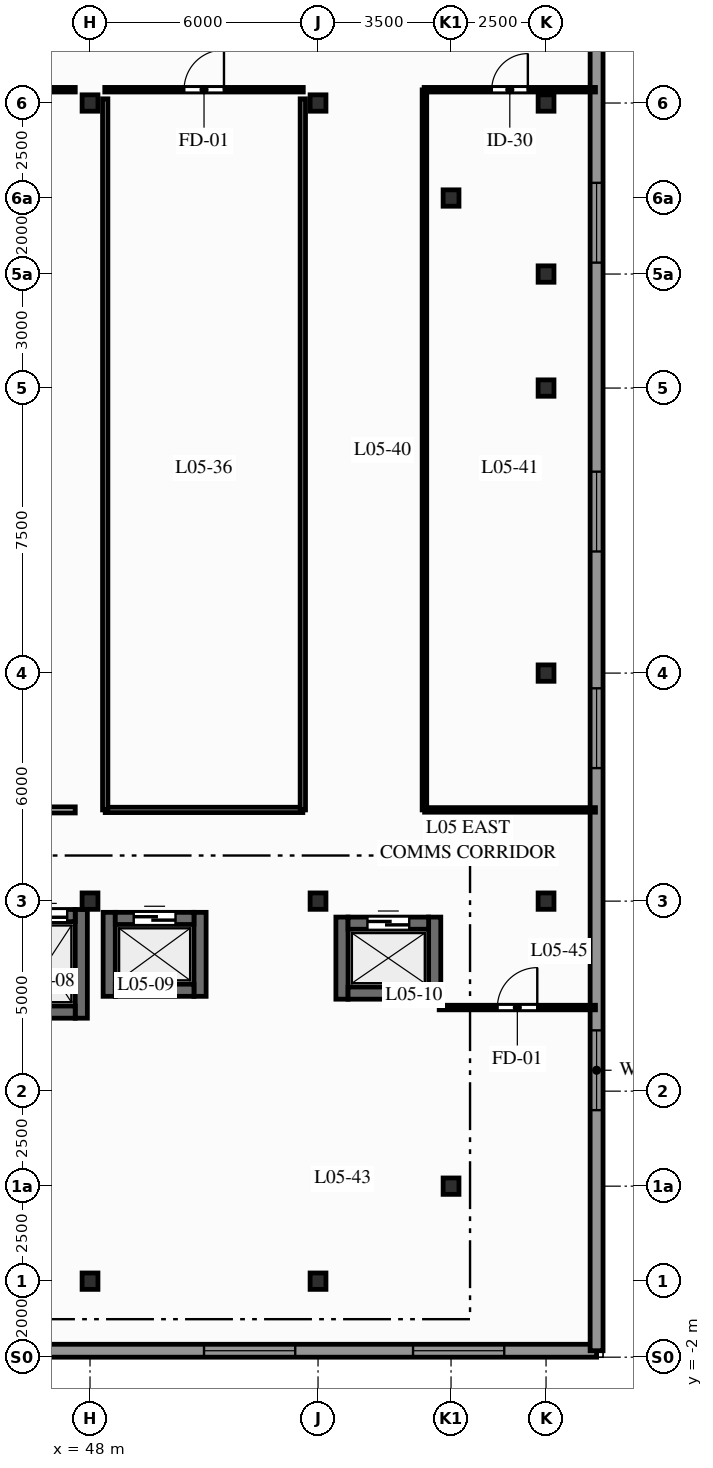
"""IFC4 building model, lengths in metres.
Left out: names, types, materials, properties, quantities, classifications, styles, units other than length and angle.
Written with IfcOpenShell. Run it as: python <this file> out.ifc"""

import sys

from ifc_helpers import new_model, si_unit, direction, frame, frame_2d, origin, origin_2d, place, context, subcontext, project, spatial, rectangle, i_section, extrude, element, fill, save


model = new_model("IFC4")
c1 = context("Model", 3, precision=1e-05, world=origin(), true_north=direction((0.0, 1.0)))
c2 = subcontext(c1, "Body", "Model", "MODEL_VIEW")
j1 = project(units=[si_unit("LENGTHUNIT", "METRE"), si_unit("PLANEANGLEUNIT", "RADIAN")], contexts=[c1])
p1 = place(None, origin())
s1 = spatial("IfcSite", under=j1, at=p1, CompositionType="ELEMENT")
p2 = place(p1, origin())
s2 = spatial("IfcBuilding", under=s1, at=p2, CompositionType="ELEMENT")
p3 = place(p2, frame((0.0, 0.0, 22.5)))
s3 = spatial("IfcBuildingStorey", under=s2, at=p3, CompositionType="ELEMENT", Elevation=22.5)
for number, where, z_axis, x_axis in (
    (1, (48.0, 0.0, 0.0), (0.0, 0.0, 1.0), (1.0, 0.0, 0.0)),
    (2, (48.0, 10.0, 0.0), (0.0, 0.0, 1.0), (1.0, 0.0, 0.0)),
    (3, (48.0, 31.0, 0.0), (0.0, 0.0, 1.0), (1.0, 0.0, 0.0)),
    (4, (54.0, 0.0, 0.0), (0.0, 0.0, 1.0), (1.0, 0.0, 0.0)),
    (5, (54.0, 10.0, 0.0), (0.0, 0.0, 1.0), (1.0, 0.0, 0.0)),
    (6, (54.0, 31.0, 0.0), (0.0, 0.0, 1.0), (1.0, 0.0, 0.0)),
    (7, (57.5, 2.5, 0.0), (0.0, 0.0, 1.0), (1.0, 0.0, 0.0)),
    (8, (57.5, 28.5, 0.0), (0.0, 0.0, 1.0), (1.0, 0.0, 0.0)),
    (9, (60.0, 10.0, 0.0), (0.0, 0.0, 1.0), (1.0, 0.0, 0.0)),
    (10, (60.0, 16.0, 0.0), (0.0, 0.0, 1.0), (1.0, 0.0, 0.0)),
    (11, (60.0, 23.5, 0.0), (0.0, 0.0, 1.0), (1.0, 0.0, 0.0)),
    (12, (60.0, 26.5, 0.0), (0.0, 0.0, 1.0), (1.0, 0.0, 0.0)),
    (13, (60.0, 31.0, 0.0), (0.0, 0.0, 1.0), (1.0, 0.0, 0.0)),
):
    element("IfcColumn", number, at=place(p3, frame(where, z_axis=z_axis, x_axis=x_axis)), inside=s3, PredefinedType="COLUMN", context=c2, shape_type="SweptSolid", body=[
        extrude(i_section(OverallWidth=0.417, OverallDepth=0.431, WebThickness=0.065, FlangeThickness=0.106, FilletRadius=0.015, at=origin_2d()), origin(), (0.0, 0.0, 1.0), 5.5),
    ])
p4 = place(p3, frame((-1.33, -1.83, 0.0), z_axis=(0.0, 0.0, 1.0), x_axis=(1.0, 0.0, 0.0)))
e14 = element("IfcWall", 14, at=p4, inside=s3, PredefinedType="STANDARD", context=c2, shape_type="SweptSolid", body=[
    extrude(rectangle(XDim=62.66, YDim=0.34, at=frame_2d((31.33, 0.0))), origin(), (0.0, 0.0, 1.0), 5.23),
])
p5 = place(p4, frame((2.83, 0.0, 0.9)))
e15 = element("IfcOpeningElement", 15, at=p5, cuts=e14, PredefinedType="OPENING", context=c2, shape_type="SweptSolid", body=[
    extrude(rectangle(XDim=2.4, YDim=2.15, at=frame_2d((1.2, 1.075))), frame((0.0, 0.18, 0.0), z_axis=(0.0, -1.0, 0.0), x_axis=(1.0, 0.0, 0.0)), (0.0, 0.0, 1.0), 0.36),
])
p6 = place(p4, frame((8.33, 0.0, 0.9)))
e16 = element("IfcOpeningElement", 16, at=p6, cuts=e14, PredefinedType="OPENING", context=c2, shape_type="SweptSolid", body=[
    extrude(rectangle(XDim=2.4, YDim=2.15, at=frame_2d((1.2, 1.075))), frame((0.0, 0.18, 0.0), z_axis=(0.0, -1.0, 0.0), x_axis=(1.0, 0.0, 0.0)), (0.0, 0.0, 1.0), 0.36),
])
p7 = place(p4, frame((52.33, 0.0, 0.9)))
e17 = element("IfcOpeningElement", 17, at=p7, cuts=e14, PredefinedType="OPENING", context=c2, shape_type="SweptSolid", body=[
    extrude(rectangle(XDim=2.4, YDim=2.15, at=frame_2d((1.2, 1.075))), frame((0.0, 0.18, 0.0), z_axis=(0.0, -1.0, 0.0), x_axis=(1.0, 0.0, 0.0)), (0.0, 0.0, 1.0), 0.36),
])
p8 = place(p4, frame((57.83, 0.0, 0.9)))
e18 = element("IfcOpeningElement", 18, at=p8, cuts=e14, PredefinedType="OPENING", context=c2, shape_type="SweptSolid", body=[
    extrude(rectangle(XDim=2.4, YDim=2.15, at=frame_2d((1.2, 1.075))), frame((0.0, 0.18, 0.0), z_axis=(0.0, -1.0, 0.0), x_axis=(1.0, 0.0, 0.0)), (0.0, 0.0, 1.0), 0.36),
])
p9 = place(p3, frame((61.33, -1.83, 0.0), z_axis=(0.0, 0.0, 1.0), x_axis=(0.0, 1.0, 0.0)))
e19 = element("IfcWall", 19, at=p9, inside=s3, PredefinedType="STANDARD", context=c2, shape_type="SweptSolid", body=[
    extrude(rectangle(XDim=36.43, YDim=0.34, at=frame_2d((18.215, 0.0))), origin(), (0.0, 0.0, 1.0), 5.23),
])
p10 = place(p9, frame((6.33, 0.0, 0.9)))
e20 = element("IfcOpeningElement", 20, at=p10, cuts=e19, PredefinedType="OPENING", context=c2, shape_type="SweptSolid", body=[
    extrude(rectangle(XDim=2.1, YDim=2.05, at=frame_2d((1.05, 1.025))), frame((0.0, 0.18, 0.0), z_axis=(0.0, -1.0, 0.0), x_axis=(1.0, 0.0, 0.0)), (0.0, 0.0, 1.0), 0.36),
])
p11 = place(p9, frame((15.33, 0.0, 0.9)))
e21 = element("IfcOpeningElement", 21, at=p11, cuts=e19, PredefinedType="OPENING", context=c2, shape_type="SweptSolid", body=[
    extrude(rectangle(XDim=2.1, YDim=2.05, at=frame_2d((1.05, 1.025))), frame((0.0, 0.18, 0.0), z_axis=(0.0, -1.0, 0.0), x_axis=(1.0, 0.0, 0.0)), (0.0, 0.0, 1.0), 0.36),
])
p12 = place(p9, frame((21.03, 0.0, 0.9)))
e22 = element("IfcOpeningElement", 22, at=p12, cuts=e19, PredefinedType="OPENING", context=c2, shape_type="SweptSolid", body=[
    extrude(rectangle(XDim=2.1, YDim=2.05, at=frame_2d((1.05, 1.025))), frame((0.0, 0.18, 0.0), z_axis=(0.0, -1.0, 0.0), x_axis=(1.0, 0.0, 0.0)), (0.0, 0.0, 1.0), 0.36),
])
p13 = place(p9, frame((28.63, 0.0, 0.9)))
e23 = element("IfcOpeningElement", 23, at=p13, cuts=e19, PredefinedType="OPENING", context=c2, shape_type="SweptSolid", body=[
    extrude(rectangle(XDim=2.1, YDim=2.05, at=frame_2d((1.05, 1.025))), frame((0.0, 0.18, 0.0), z_axis=(0.0, -1.0, 0.0), x_axis=(1.0, 0.0, 0.0)), (0.0, 0.0, 1.0), 0.36),
])
p14 = place(p3, frame((47.77, 6.92, 0.0), z_axis=(0.0, 0.0, 1.0), x_axis=(0.0, 1.0, 0.0)))
e24 = element("IfcWall", 24, at=p14, inside=s3, PredefinedType="SHEAR", context=c2, shape_type="SweptSolid", body=[
    extrude(rectangle(XDim=2.86, YDim=0.32, at=frame_2d((1.43, 0.0))), origin(), (0.0, 0.0, 1.0), 5.23),
])
p15 = place(p3, frame((46.09, 7.08, 0.0), z_axis=(0.0, 0.0, 1.0), x_axis=(1.0, 0.0, 0.0)))
e25 = element("IfcWall", 25, at=p15, inside=s3, PredefinedType="SHEAR", context=c2, shape_type="SweptSolid", body=[
    extrude(rectangle(XDim=1.52, YDim=0.32, at=frame_2d((0.76, 0.0))), origin(), (0.0, 0.0, 1.0), 5.23),
])
p16 = place(p3, frame((46.09, 9.62, 0.0), z_axis=(0.0, 0.0, 1.0), x_axis=(1.0, 0.0, 0.0)))
e26 = element("IfcWall", 26, at=p16, inside=s3, PredefinedType="SHEAR", context=c2, shape_type="SweptSolid", body=[
    extrude(rectangle(XDim=1.52, YDim=0.32, at=frame_2d((0.76, 0.0))), origin(), (0.0, 0.0, 1.0), 5.23),
])
p17 = place(p16, frame((0.21, 0.0, 0.0)))
e27 = element("IfcOpeningElement", 27, at=p17, cuts=e26, PredefinedType="OPENING", context=c2, shape_type="SweptSolid", body=[
    extrude(rectangle(XDim=1.1, YDim=2.06, at=frame_2d((0.55, 1.03))), frame((0.0, 0.17, 0.0), z_axis=(0.0, -1.0, 0.0), x_axis=(1.0, 0.0, 0.0)), (0.0, 0.0, 1.0), 0.34),
])
for number, where, z_axis, x_axis in (
    (28, (48.505, 7.495, 0.0), (0.0, 0.0, 1.0), (0.0, 1.0, 0.0)),
    (29, (50.895, 7.495, 0.0), (0.0, 0.0, 1.0), (0.0, 1.0, 0.0)),
):
    element("IfcWall", number, at=place(p3, frame(where, z_axis=z_axis, x_axis=x_axis)), inside=s3, PredefinedType="SHEAR", context=c2, shape_type="SweptSolid", body=[
        extrude(rectangle(XDim=2.21, YDim=0.32, at=frame_2d((1.105, 0.0))), origin(), (0.0, 0.0, 1.0), 5.23),
    ])
p18 = place(p3, frame((48.665, 7.655, 0.0), z_axis=(0.0, 0.0, 1.0), x_axis=(1.0, 0.0, 0.0)))
e30 = element("IfcWall", 30, at=p18, inside=s3, PredefinedType="SHEAR", context=c2, shape_type="SweptSolid", body=[
    extrude(rectangle(XDim=2.07, YDim=0.32, at=frame_2d((1.035, 0.0))), origin(), (0.0, 0.0, 1.0), 5.23),
])
p19 = place(p3, frame((48.665, 9.545, 0.0), z_axis=(0.0, 0.0, 1.0), x_axis=(1.0, 0.0, 0.0)))
e31 = element("IfcWall", 31, at=p19, inside=s3, PredefinedType="SHEAR", context=c2, shape_type="SweptSolid", body=[
    extrude(rectangle(XDim=2.07, YDim=0.32, at=frame_2d((1.035, 0.0))), origin(), (0.0, 0.0, 1.0), 5.23),
])
p20 = place(p19, frame((0.485, 0.0, 0.0)))
e32 = element("IfcOpeningElement", 32, at=p20, cuts=e31, PredefinedType="OPENING", context=c2, shape_type="SweptSolid", body=[
    extrude(rectangle(XDim=1.1, YDim=2.06, at=frame_2d((0.55, 1.03))), frame((0.0, 0.17, 0.0), z_axis=(0.0, -1.0, 0.0), x_axis=(1.0, 0.0, 0.0)), (0.0, 0.0, 1.0), 0.34),
])
for number, where, z_axis, x_axis in (
    (33, (54.63, 7.42, 0.0), (0.0, 0.0, 1.0), (0.0, 1.0, 0.0)),
    (34, (57.07, 7.42, 0.0), (0.0, 0.0, 1.0), (0.0, 1.0, 0.0)),
):
    element("IfcWall", number, at=place(p3, frame(where, z_axis=z_axis, x_axis=x_axis)), inside=s3, PredefinedType="SHEAR", context=c2, shape_type="SweptSolid", body=[
        extrude(rectangle(XDim=2.16, YDim=0.32, at=frame_2d((1.08, 0.0))), origin(), (0.0, 0.0, 1.0), 5.23),
    ])
p21 = place(p3, frame((54.79, 7.58, 0.0), z_axis=(0.0, 0.0, 1.0), x_axis=(1.0, 0.0, 0.0)))
e35 = element("IfcWall", 35, at=p21, inside=s3, PredefinedType="SHEAR", context=c2, shape_type="SweptSolid", body=[
    extrude(rectangle(XDim=2.12, YDim=0.32, at=frame_2d((1.06, 0.0))), origin(), (0.0, 0.0, 1.0), 5.23),
])
p22 = place(p3, frame((54.79, 9.42, 0.0), z_axis=(0.0, 0.0, 1.0), x_axis=(1.0, 0.0, 0.0)))
e36 = element("IfcWall", 36, at=p22, inside=s3, PredefinedType="SHEAR", context=c2, shape_type="SweptSolid", body=[
    extrude(rectangle(XDim=2.12, YDim=0.32, at=frame_2d((1.06, 0.0))), origin(), (0.0, 0.0, 1.0), 5.23),
])
p23 = place(p22, frame((0.51, 0.0, 0.0)))
e37 = element("IfcOpeningElement", 37, at=p23, cuts=e36, PredefinedType="OPENING", context=c2, shape_type="SweptSolid", body=[
    extrude(rectangle(XDim=1.1, YDim=2.06, at=frame_2d((0.55, 1.03))), frame((0.0, 0.17, 0.0), z_axis=(0.0, -1.0, 0.0), x_axis=(1.0, 0.0, 0.0)), (0.0, 0.0, 1.0), 0.34),
])
p24 = place(p3, frame((44.493, 12.4, 0.0), z_axis=(0.0, 0.0, 1.0), x_axis=(1.0, 0.0, 0.0)))
e38 = element("IfcWall", 38, at=p24, inside=s3, PredefinedType="PARTITIONING", context=c2, shape_type="SweptSolid", body=[
    extrude(rectangle(XDim=3.119, YDim=0.16, at=frame_2d((1.559, 0.0))), origin(), (0.0, 0.0, 1.0), 5.23),
])
p25 = place(p3, frame((44.493, 31.35, 0.0), z_axis=(0.0, 0.0, 1.0), x_axis=(1.0, 0.0, 0.0)))
e39 = element("IfcWall", 39, at=p25, inside=s3, PredefinedType="PARTITIONING", context=c2, shape_type="SweptSolid", body=[
    extrude(rectangle(XDim=3.119, YDim=0.12, at=frame_2d((1.559, 0.0))), origin(), (0.0, 0.0, 1.0), 5.23),
])
p26 = place(p25, frame((1.084, 0.0, 0.0)))
e40 = element("IfcOpeningElement", 40, at=p26, cuts=e39, PredefinedType="OPENING", context=c2, shape_type="SweptSolid", body=[
    extrude(rectangle(XDim=0.95, YDim=2.05, at=frame_2d((0.475, 1.025))), frame((0.0, 0.07, 0.0), z_axis=(0.0, -1.0, 0.0), x_axis=(1.0, 0.0, 0.0)), (0.0, 0.0, 1.0), 0.14),
])
p27 = place(p3, frame((48.389, 31.35, 0.0), z_axis=(0.0, 0.0, 1.0), x_axis=(1.0, 0.0, 0.0)))
e41 = element("IfcWall", 41, at=p27, inside=s3, PredefinedType="PARTITIONING", context=c2, shape_type="SweptSolid", body=[
    extrude(rectangle(XDim=5.223, YDim=0.12, at=frame_2d((2.611, 0.0))), origin(), (0.0, 0.0, 1.0), 5.23),
])
p28 = place(p27, frame((2.086, 0.0, 0.0)))
e42 = element("IfcOpeningElement", 42, at=p28, cuts=e41, PredefinedType="OPENING", context=c2, shape_type="SweptSolid", body=[
    extrude(rectangle(XDim=1.05, YDim=2.06, at=frame_2d((0.525, 1.03))), frame((0.0, 0.07, 0.0), z_axis=(0.0, -1.0, 0.0), x_axis=(1.0, 0.0, 0.0)), (0.0, 0.0, 1.0), 0.14),
])
p29 = place(p3, frame((56.793, 31.35, 0.0), z_axis=(0.0, 0.0, 1.0), x_axis=(1.0, 0.0, 0.0)))
e43 = element("IfcWall", 43, at=p29, inside=s3, PredefinedType="PARTITIONING", context=c2, shape_type="SweptSolid", body=[
    extrude(rectangle(XDim=4.507, YDim=0.12, at=frame_2d((2.254, 0.0))), origin(), (0.0, 0.0, 1.0), 5.23),
])
p30 = place(p29, frame((1.779, 0.0, 0.0)))
e44 = element("IfcOpeningElement", 44, at=p30, cuts=e43, PredefinedType="OPENING", context=c2, shape_type="SweptSolid", body=[
    extrude(rectangle(XDim=0.95, YDim=2.05, at=frame_2d((0.475, 1.025))), frame((0.0, 0.07, 0.0), z_axis=(0.0, -1.0, 0.0), x_axis=(1.0, 0.0, 0.0)), (0.0, 0.0, 1.0), 0.14),
])
p31 = place(p3, frame((56.8, 12.4, 0.0), z_axis=(0.0, 0.0, 1.0), x_axis=(0.0, 1.0, 0.0)))
e45 = element("IfcWall", 45, at=p31, inside=s3, PredefinedType="PARTITIONING", context=c2, shape_type="SweptSolid", body=[
    extrude(rectangle(XDim=18.946, YDim=0.12, at=frame_2d((9.473, 0.0))), origin(), (0.0, 0.0, 1.0), 4.585),
])
p32 = place(p3, frame((56.804, 12.4, 0.0), z_axis=(0.0, 0.0, 1.0), x_axis=(1.0, 0.0, 0.0)))
e46 = element("IfcWall", 46, at=p32, inside=s3, PredefinedType="PARTITIONING", context=c2, shape_type="SweptSolid", body=[
    extrude(rectangle(XDim=4.496, YDim=0.12, at=frame_2d((2.248, 0.0))), origin(), (0.0, 0.0, 1.0), 4.666),
])
p33 = place(p3, frame((57.189, 7.2, 0.0), z_axis=(0.0, 0.0, 1.0), x_axis=(1.0, 0.0, 0.0)))
e47 = element("IfcWall", 47, at=p33, inside=s3, PredefinedType="PARTITIONING", context=c2, shape_type="SweptSolid", body=[
    extrude(rectangle(XDim=4.111, YDim=0.12, at=frame_2d((2.056, 0.0))), origin(), (0.0, 0.0, 1.0), 5.23),
])
p34 = place(p33, frame((1.531, 0.0, 0.0)))
e48 = element("IfcOpeningElement", 48, at=p34, cuts=e47, PredefinedType="OPENING", context=c2, shape_type="SweptSolid", body=[
    extrude(rectangle(XDim=1.05, YDim=2.06, at=frame_2d((0.525, 1.03))), frame((0.0, 0.07, 0.0), z_axis=(0.0, -1.0, 0.0), x_axis=(1.0, 0.0, 0.0)), (0.0, 0.0, 1.0), 0.14),
])
p35 = place(p3, frame((48.4, 12.4, 0.0), z_axis=(0.0, 0.0, 1.0), x_axis=(1.0, 0.0, 0.0)))
e49 = element("IfcWall", 49, at=p35, inside=s3, PredefinedType="PARTITIONING", context=c2, shape_type="SweptSolid", body=[
    extrude(rectangle(XDim=5.2, YDim=0.14, at=frame_2d((2.6, 0.0))), origin(), (0.0, 0.0, 1.0), 5.23),
])
for number, where, z_axis, x_axis in (
    (50, (53.6, 12.4, 0.0), (0.0, 0.0, 1.0), (0.0, 1.0, 0.0)),
    (51, (48.4, 12.4, 0.0), (0.0, 0.0, 1.0), (0.0, 1.0, 0.0)),
):
    element("IfcWall", number, at=place(p3, frame(where, z_axis=z_axis, x_axis=x_axis)), inside=s3, PredefinedType="PARTITIONING", context=c2, shape_type="SweptSolid", body=[
        extrude(rectangle(XDim=18.71, YDim=0.14, at=frame_2d((9.355, 0.0))), origin(), (0.0, 0.0, 1.0), 3.405),
    ])
p36 = place(p7, origin())
e52 = element("IfcWindow", 52, at=p36, inside=s3, PartitioningType="SINGLE_PANEL", PredefinedType="WINDOW", context=c2, shape_type="SweptSolid", body=[
    extrude(rectangle(XDim=2.4, YDim=2.15, at=frame_2d((1.2, 1.075))), frame((0.0, 0.03, 0.0), z_axis=(0.0, -1.0, 0.0), x_axis=(1.0, 0.0, 0.0)), (0.0, 0.0, 1.0), 0.06),
])
fill(e17, e52)
p37 = place(p8, origin())
e53 = element("IfcWindow", 53, at=p37, inside=s3, PartitioningType="SINGLE_PANEL", PredefinedType="WINDOW", context=c2, shape_type="SweptSolid", body=[
    extrude(rectangle(XDim=2.4, YDim=2.15, at=frame_2d((1.2, 1.075))), frame((0.0, 0.03, 0.0), z_axis=(0.0, -1.0, 0.0), x_axis=(1.0, 0.0, 0.0)), (0.0, 0.0, 1.0), 0.06),
])
fill(e18, e53)
p38 = place(p10, origin())
e54 = element("IfcWindow", 54, at=p38, inside=s3, PartitioningType="SINGLE_PANEL", PredefinedType="WINDOW", context=c2, shape_type="SweptSolid", body=[
    extrude(rectangle(XDim=2.1, YDim=2.05, at=frame_2d((1.05, 1.025))), frame((0.0, 0.03, 0.0), z_axis=(0.0, -1.0, 0.0), x_axis=(1.0, 0.0, 0.0)), (0.0, 0.0, 1.0), 0.06),
])
fill(e20, e54)
p39 = place(p11, origin())
e55 = element("IfcWindow", 55, at=p39, inside=s3, PartitioningType="SINGLE_PANEL", PredefinedType="WINDOW", context=c2, shape_type="SweptSolid", body=[
    extrude(rectangle(XDim=2.1, YDim=2.05, at=frame_2d((1.05, 1.025))), frame((0.0, 0.03, 0.0), z_axis=(0.0, -1.0, 0.0), x_axis=(1.0, 0.0, 0.0)), (0.0, 0.0, 1.0), 0.06),
])
fill(e21, e55)
p40 = place(p12, origin())
e56 = element("IfcWindow", 56, at=p40, inside=s3, PartitioningType="SINGLE_PANEL", PredefinedType="WINDOW", context=c2, shape_type="SweptSolid", body=[
    extrude(rectangle(XDim=2.1, YDim=2.05, at=frame_2d((1.05, 1.025))), frame((0.0, 0.03, 0.0), z_axis=(0.0, -1.0, 0.0), x_axis=(1.0, 0.0, 0.0)), (0.0, 0.0, 1.0), 0.06),
])
fill(e22, e56)
p41 = place(p13, origin())
e57 = element("IfcWindow", 57, at=p41, inside=s3, PartitioningType="SINGLE_PANEL", PredefinedType="WINDOW", context=c2, shape_type="SweptSolid", body=[
    extrude(rectangle(XDim=2.1, YDim=2.05, at=frame_2d((1.05, 1.025))), frame((0.0, 0.03, 0.0), z_axis=(0.0, -1.0, 0.0), x_axis=(1.0, 0.0, 0.0)), (0.0, 0.0, 1.0), 0.06),
])
fill(e23, e57)
p42 = place(p17, origin())
e58 = element("IfcDoor", 58, at=p42, inside=s3, OperationType="SLIDING_TO_RIGHT", PredefinedType="DOOR", context=c2, shape_type="SweptSolid", body=[
    extrude(rectangle(XDim=1.1, YDim=2.06, at=frame_2d((0.55, 1.03))), frame((0.0, 0.025, 0.0), z_axis=(0.0, -1.0, 0.0), x_axis=(1.0, 0.0, 0.0)), (0.0, 0.0, 1.0), 0.05),
])
fill(e27, e58)
p43 = place(p20, origin())
e59 = element("IfcDoor", 59, at=p43, inside=s3, OperationType="SLIDING_TO_LEFT", PredefinedType="DOOR", context=c2, shape_type="SweptSolid", body=[
    extrude(rectangle(XDim=1.1, YDim=2.06, at=frame_2d((0.55, 1.03))), frame((0.0, 0.025, 0.0), z_axis=(0.0, -1.0, 0.0), x_axis=(1.0, 0.0, 0.0)), (0.0, 0.0, 1.0), 0.05),
])
fill(e32, e59)
p44 = place(p23, origin())
e60 = element("IfcDoor", 60, at=p44, inside=s3, OperationType="SLIDING_TO_RIGHT", PredefinedType="DOOR", context=c2, shape_type="SweptSolid", body=[
    extrude(rectangle(XDim=1.1, YDim=2.06, at=frame_2d((0.55, 1.03))), frame((0.0, 0.025, 0.0), z_axis=(0.0, -1.0, 0.0), x_axis=(1.0, 0.0, 0.0)), (0.0, 0.0, 1.0), 0.05),
])
fill(e37, e60)
p45 = place(p28, origin())
e61 = element("IfcDoor", 61, at=p45, inside=s3, OperationType="SINGLE_SWING_RIGHT", PredefinedType="DOOR", context=c2, shape_type="SweptSolid", body=[
    extrude(rectangle(XDim=1.05, YDim=2.06, at=frame_2d((0.525, 1.03))), frame((0.0, 0.025, 0.0), z_axis=(0.0, -1.0, 0.0), x_axis=(1.0, 0.0, 0.0)), (0.0, 0.0, 1.0), 0.05),
])
fill(e42, e61)
p46 = place(p30, origin())
e62 = element("IfcDoor", 62, at=p46, inside=s3, OperationType="SINGLE_SWING_RIGHT", PredefinedType="DOOR", context=c2, shape_type="SweptSolid", body=[
    extrude(rectangle(XDim=0.95, YDim=2.05, at=frame_2d((0.475, 1.025))), frame((0.0, 0.025, 0.0), z_axis=(0.0, -1.0, 0.0), x_axis=(1.0, 0.0, 0.0)), (0.0, 0.0, 1.0), 0.05),
])
fill(e44, e62)
p47 = place(p34, origin())
e63 = element("IfcDoor", 63, at=p47, inside=s3, OperationType="SINGLE_SWING_RIGHT", PredefinedType="DOOR", context=c2, shape_type="SweptSolid", body=[
    extrude(rectangle(XDim=1.05, YDim=2.06, at=frame_2d((0.525, 1.03))), frame((0.0, 0.025, 0.0), z_axis=(0.0, -1.0, 0.0), x_axis=(1.0, 0.0, 0.0)), (0.0, 0.0, 1.0), 0.05),
])
fill(e48, e63)
save(model, sys.argv[1])
